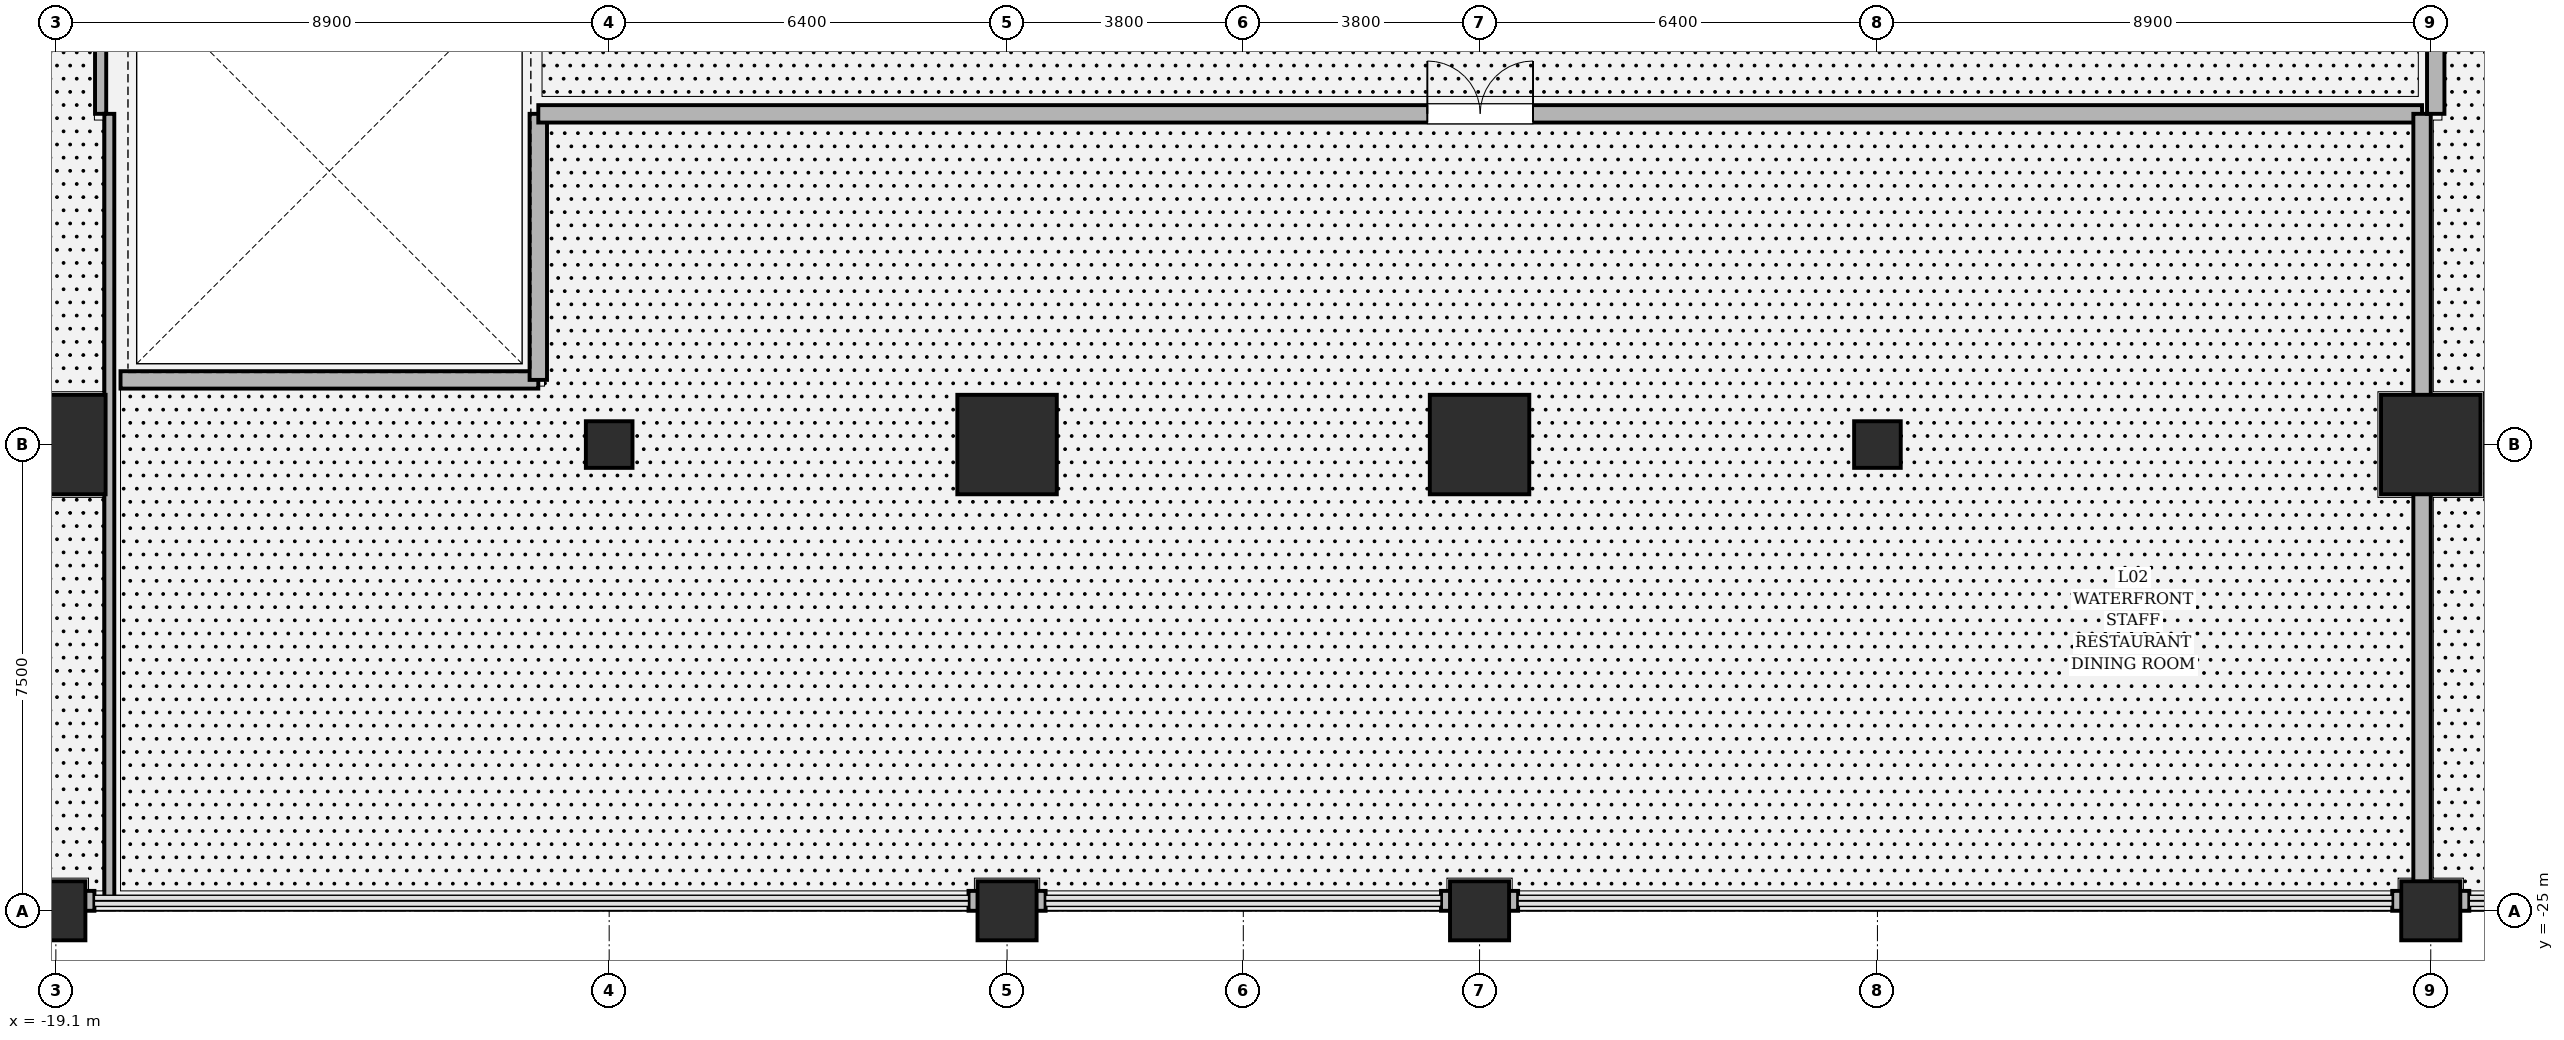
"""IFC4 building model, lengths in metres.
Left out: names, types, materials, properties, quantities, classifications, styles, units other than length and angle.
Written with IfcOpenShell. Run it as: python <this file> out.ifc"""

import sys

from ifc_helpers import new_model, si_unit, direction, frame, frame_2d, origin, origin_2d, place, context, subcontext, project, spatial, rectangle, hollow_rectangle, circle, extrude, element, fill, save


model = new_model("IFC4")
c1 = context("Model", 3, precision=1e-05, world=origin(), true_north=direction((0.0, 1.0)))
c2 = subcontext(c1, "Body", "Model", "MODEL_VIEW")
j1 = project(units=[si_unit("LENGTHUNIT", "METRE"), si_unit("PLANEANGLEUNIT", "RADIAN")], contexts=[c1])
p1 = place(None, origin())
s1 = spatial("IfcSite", under=j1, at=p1, CompositionType="ELEMENT")
p2 = place(p1, origin())
s2 = spatial("IfcBuilding", under=s1, at=p2, CompositionType="ELEMENT")
p3 = place(p2, frame((0.0, 0.0, 11.4)))
s3 = spatial("IfcBuildingStorey", under=s2, at=p3, CompositionType="ELEMENT", Elevation=11.4)
for number, where, z_axis, x_axis in (
    (1, (-19.1, -17.5, 0.0), (0.0, 0.0, 1.0), (1.0, 0.0, 0.0)),
    (2, (-3.8, -17.5, 0.0), (0.0, 0.0, 1.0), (1.0, 0.0, 0.0)),
    (3, (3.8, -17.5, 0.0), (0.0, 0.0, 1.0), (1.0, 0.0, 0.0)),
    (4, (19.1, -17.5, 0.0), (0.0, 0.0, 1.0), (1.0, 0.0, 0.0)),
):
    element("IfcColumn", number, at=place(p3, frame(where, z_axis=z_axis, x_axis=x_axis)), inside=s3, PredefinedType="COLUMN", context=c2, shape_type="SweptSolid", body=[
        extrude(hollow_rectangle(XDim=1.6, YDim=1.6, WallThickness=0.05, at=origin_2d()), origin(), (0.0, 0.0, 1.0), 5.4),
    ])
for number, where, z_axis, x_axis in (
    (5, (-19.1, -25.0, 0.0), (0.0, 0.0, 1.0), (1.0, 0.0, 0.0)),
    (6, (-3.8, -25.0, 0.0), (0.0, 0.0, 1.0), (1.0, 0.0, 0.0)),
    (7, (3.8, -25.0, 0.0), (0.0, 0.0, 1.0), (1.0, 0.0, 0.0)),
    (8, (19.1, -25.0, 0.0), (0.0, 0.0, 1.0), (1.0, 0.0, 0.0)),
):
    element("IfcColumn", number, at=place(p3, frame(where, z_axis=z_axis, x_axis=x_axis)), inside=s3, PredefinedType="COLUMN", context=c2, shape_type="SweptSolid", body=[
        extrude(rectangle(XDim=0.95, YDim=0.95, at=origin_2d()), origin(), (0.0, 0.0, 1.0), 5.4),
    ])
for number, where, z_axis, x_axis in (
    (9, (-10.2, -17.5, 0.0), (0.0, 0.0, 1.0), (1.0, 0.0, 0.0)),
    (10, (10.2, -17.5, 0.0), (0.0, 0.0, 1.0), (1.0, 0.0, 0.0)),
):
    element("IfcColumn", number, at=place(p3, frame(where, z_axis=z_axis, x_axis=x_axis)), inside=s3, PredefinedType="PILASTER", context=c2, shape_type="SweptSolid", body=[
        extrude(circle(Radius=0.375, at=origin_2d()), origin(), (0.0, 0.0, 1.0), 5.4),
    ])
for number, where, z_axis, x_axis in (
    (11, (-19.72, -24.84, 0.0), (0.0, 0.0, 1.0), (1.0, 0.0, 0.0)),
    (12, (-4.42, -24.84, 0.0), (0.0, 0.0, 1.0), (1.0, 0.0, 0.0)),
    (13, (3.18, -24.84, 0.0), (0.0, 0.0, 1.0), (1.0, 0.0, 0.0)),
    (14, (18.48, -24.84, 0.0), (0.0, 0.0, 1.0), (1.0, 0.0, 0.0)),
):
    element("IfcWall", number, at=place(p3, frame(where, z_axis=z_axis, x_axis=x_axis)), inside=s3, PredefinedType="SOLIDWALL", context=c2, shape_type="SweptSolid", body=[
        extrude(rectangle(XDim=1.24, YDim=0.32, at=frame_2d((0.62, 0.0))), origin(), (0.0, 0.0, 1.0), 4.414),
    ])
p4 = place(p3, frame((-18.38, 2.22, 0.0), z_axis=(0.0, 0.0, 1.0), x_axis=(0.0, -1.0, 0.0)))
e15 = element("IfcWall", 15, at=p4, inside=s3, PredefinedType="PARTITIONING", context=c2, shape_type="SweptSolid", body=[
    extrude(rectangle(XDim=14.4, YDim=0.18, at=frame_2d((7.2, 0.0))), origin(), (0.0, 0.0, 1.0), 4.414),
])
p5 = place(p3, frame((-18.24, -12.18, 0.0), z_axis=(0.0, 0.0, 1.0), x_axis=(0.0, -1.0, 0.0)))
e16 = element("IfcWall", 16, at=p5, inside=s3, PredefinedType="PARTITIONING", context=c2, shape_type="SweptSolid", body=[
    extrude(rectangle(XDim=12.6, YDim=0.16, at=frame_2d((6.3, 0.0))), origin(), (0.0, 0.0, 1.0), 4.414),
])
p6 = place(p3, frame((-18.06, -16.46, 0.0), z_axis=(0.0, 0.0, 1.0), x_axis=(1.0, 0.0, 0.0)))
e17 = element("IfcWall", 17, at=p6, inside=s3, PredefinedType="SOLIDWALL", context=c2, shape_type="SweptSolid", body=[
    extrude(rectangle(XDim=6.72, YDim=0.28, at=frame_2d((3.36, 0.0))), origin(), (0.0, 0.0, 1.0), 4.664),
])
p7 = place(p3, frame((-11.34, -16.46, 0.0), z_axis=(0.0, 0.0, 1.0), x_axis=(0.0, 1.0, 0.0)))
e18 = element("IfcWall", 18, at=p7, inside=s3, PredefinedType="SOLIDWALL", context=c2, shape_type="SweptSolid", body=[
    extrude(rectangle(XDim=4.28, YDim=0.28, at=frame_2d((2.14, 0.0))), origin(), (0.0, 0.0, 1.0), 4.664),
])
p8 = place(p3, frame((-11.34, -12.18, 0.0), z_axis=(0.0, 0.0, 1.0), x_axis=(1.0, 0.0, 0.0)))
e19 = element("IfcWall", 19, at=p8, inside=s3, PredefinedType="SOLIDWALL", context=c2, shape_type="SweptSolid", body=[
    extrude(rectangle(XDim=30.3, YDim=0.28, at=frame_2d((15.15, 0.0))), origin(), (0.0, 0.0, 1.0), 4.414),
])
p9 = place(p8, frame((14.3, 0.0, 0.0)))
e20 = element("IfcOpeningElement", 20, at=p9, cuts=e19, PredefinedType="OPENING", context=c2, shape_type="SweptSolid", body=[
    extrude(rectangle(XDim=1.7, YDim=2.3, at=frame_2d((0.85, 1.15))), frame((0.0, 0.15, 0.0), z_axis=(0.0, -1.0, 0.0), x_axis=(1.0, 0.0, 0.0)), (0.0, 0.0, 1.0), 0.3),
])
p10 = place(p3, frame((18.96, -12.18, 0.0), z_axis=(0.0, 0.0, 1.0), x_axis=(0.0, -1.0, 0.0)))
e21 = element("IfcWall", 21, at=p10, inside=s3, PredefinedType="SOLIDWALL", context=c2, shape_type="SweptSolid", body=[
    extrude(rectangle(XDim=12.6, YDim=0.28, at=frame_2d((6.3, 0.0))), origin(), (0.0, 0.0, 1.0), 4.414),
])
p11 = place(p3, frame((19.18, -12.18, 0.0), z_axis=(0.0, 0.0, 1.0), x_axis=(0.0, 1.0, 0.0)))
e22 = element("IfcWall", 22, at=p11, inside=s3, PredefinedType="SOLIDWALL", context=c2, shape_type="SweptSolid", body=[
    extrude(rectangle(XDim=14.4, YDim=0.28, at=frame_2d((7.2, 0.0))), origin(), (0.0, 0.0, 1.0), 4.414),
])
p12 = place(p11, frame((5.9, 0.0, 0.0)))
e23 = element("IfcOpeningElement", 23, at=p12, cuts=e22, PredefinedType="OPENING", context=c2, shape_type="SweptSolid", body=[
    extrude(rectangle(XDim=1.7, YDim=2.3, at=frame_2d((0.85, 1.15))), frame((0.0, 0.15, 0.0), z_axis=(0.0, -1.0, 0.0), x_axis=(1.0, 0.0, 0.0)), (0.0, 0.0, 1.0), 0.3),
])
p13 = place(p9, origin())
e24 = element("IfcDoor", 24, at=p13, inside=s3, OperationType="DOUBLE_DOOR_SINGLE_SWING", PredefinedType="DOOR", context=c2, shape_type="SweptSolid", body=[
    extrude(rectangle(XDim=1.7, YDim=2.3, at=frame_2d((0.85, 1.15))), frame((0.0, 0.025, 0.0), z_axis=(0.0, -1.0, 0.0), x_axis=(1.0, 0.0, 0.0)), (0.0, 0.0, 1.0), 0.05),
])
fill(e20, e24)
save(model, sys.argv[1])
